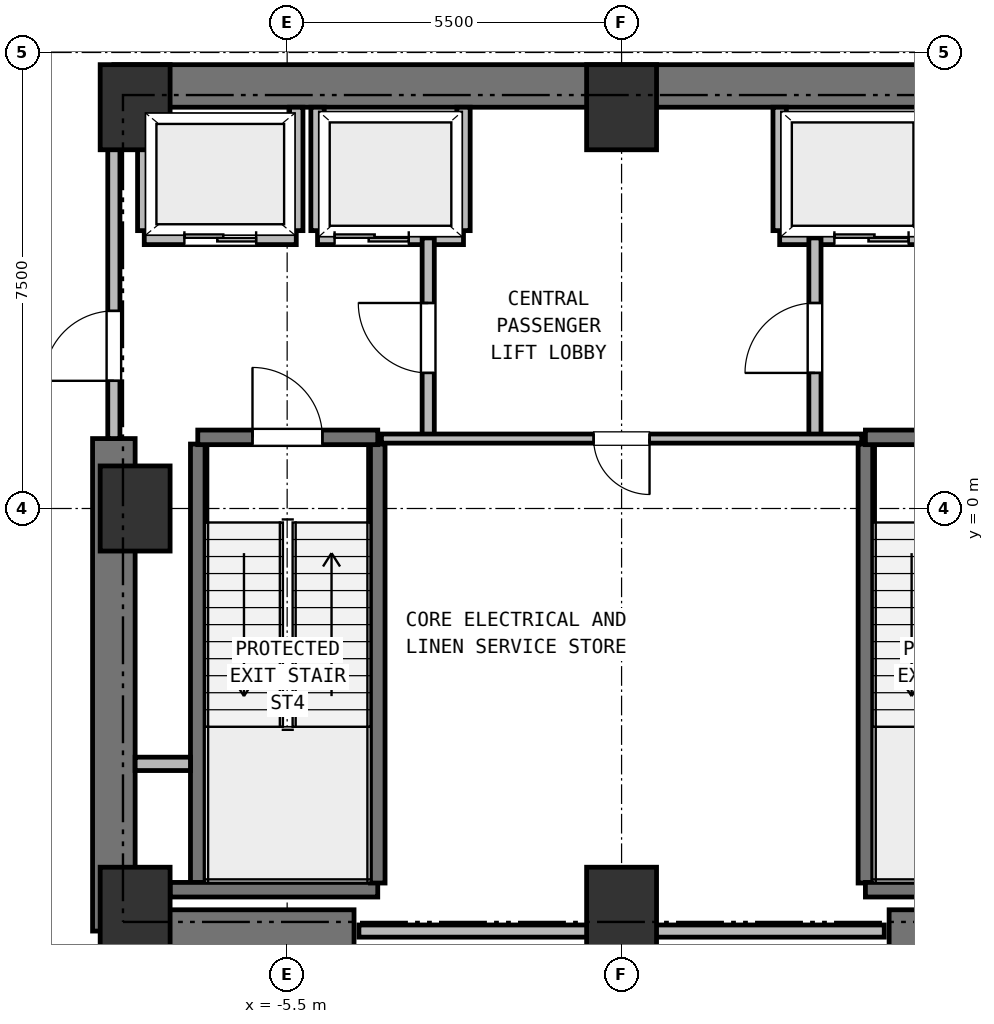
"""IFC4 building model, lengths in metres.
Left out: names, types, materials, properties, quantities, classifications, styles, units other than length and angle.
Written with IfcOpenShell. Run it as: python <this file> out.ifc"""

import sys

from ifc_helpers import new_model, si_unit, direction, frame, frame_2d, origin, origin_2d, place, context, subcontext, project, spatial, rectangle, extrude, element, fill, save


model = new_model("IFC4")
c1 = context("Model", 3, precision=1e-05, world=origin(), true_north=direction((0.0, 1.0)))
c2 = subcontext(c1, "Body", "Model", "MODEL_VIEW")
j1 = project(units=[si_unit("LENGTHUNIT", "METRE"), si_unit("PLANEANGLEUNIT", "RADIAN")], contexts=[c1])
p1 = place(None, origin())
s1 = spatial("IfcSite", under=j1, at=p1, CompositionType="ELEMENT")
p2 = place(p1, origin())
s2 = spatial("IfcBuilding", under=s1, at=p2, CompositionType="ELEMENT")
p3 = place(p2, frame((0.0, 0.0, -13.5)))
s3 = spatial("IfcBuildingStorey", under=s2, at=p3, CompositionType="ELEMENT", Elevation=-13.5)
for number, where, z_axis, x_axis in (
    (1, (-8.0, -6.6, 0.0), (0.0, 0.0, 1.0), (1.0, 0.0, 0.0)),
    (2, (0.0, -6.6, 0.0), (0.0, 0.0, 1.0), (1.0, 0.0, 0.0)),
    (3, (0.0, 6.6, 0.0), (0.0, 0.0, 1.0), (1.0, 0.0, 0.0)),
    (4, (-8.0, 6.6, 0.0), (0.0, 0.0, 1.0), (1.0, 0.0, 0.0)),
    (5, (-8.0, 0.0, 0.0), (0.0, 0.0, 1.0), (1.0, 0.0, 0.0)),
):
    element("IfcColumn", number, at=place(p3, frame(where, z_axis=z_axis, x_axis=x_axis)), inside=s3, PredefinedType="COLUMN", context=c2, shape_type="SweptSolid", body=[
        extrude(rectangle(XDim=1.15, YDim=1.4, at=origin_2d()), origin(), (0.0, 0.0, 1.0), 4.5),
    ])
p4 = place(p3, frame((-8.35, 6.95, 0.0), z_axis=(0.0, 0.0, 1.0), x_axis=(1.0, 0.0, 0.0)))
e6 = element("IfcWall", 6, at=p4, inside=s3, PredefinedType="SHEAR", context=c2, shape_type="SweptSolid", body=[
    extrude(rectangle(XDim=16.7, YDim=0.7, at=frame_2d((8.35, 0.0))), origin(), (0.0, 0.0, 1.0), 4.2),
])
for number, where, z_axis, x_axis in (
    (7, (-8.35, -6.95, 0.0), (0.0, 0.0, 1.0), (1.0, 0.0, 0.0)),
    (8, (4.4, -6.95, 0.0), (0.0, 0.0, 1.0), (1.0, 0.0, 0.0)),
):
    element("IfcWall", number, at=place(p3, frame(where, z_axis=z_axis, x_axis=x_axis)), inside=s3, PredefinedType="SHEAR", context=c2, shape_type="SweptSolid", body=[
        extrude(rectangle(XDim=3.95, YDim=0.7, at=frame_2d((1.975, 0.0))), origin(), (0.0, 0.0, 1.0), 4.2),
    ])
p5 = place(p3, frame((-8.35, -6.95, 0.0), z_axis=(0.0, 0.0, 1.0), x_axis=(0.0, 1.0, 0.0)))
e9 = element("IfcWall", 9, at=p5, inside=s3, PredefinedType="SHEAR", context=c2, shape_type="SweptSolid", body=[
    extrude(rectangle(XDim=8.1, YDim=0.7, at=frame_2d((4.05, 0.0))), origin(), (0.0, 0.0, 1.0), 4.2),
])
p6 = place(p3, frame((-6.97, -6.16, 0.0), z_axis=(0.0, 0.0, 1.0), x_axis=(0.0, 1.0, 0.0)))
e10 = element("IfcWall", 10, at=p6, inside=s3, PredefinedType="SHEAR", context=c2, shape_type="SweptSolid", body=[
    extrude(rectangle(XDim=7.22, YDim=0.24, at=frame_2d((3.61, 0.0))), origin(), (0.0, 0.0, 1.0), 4.2),
])
p7 = place(p3, frame((-7.425, -6.27, 0.0), z_axis=(0.0, 0.0, 1.0), x_axis=(1.0, 0.0, 0.0)))
e11 = element("IfcWall", 11, at=p7, inside=s3, PredefinedType="SHEAR", context=c2, shape_type="SweptSolid", body=[
    extrude(rectangle(XDim=3.415, YDim=0.24, at=frame_2d((1.708, 0.0))), origin(), (0.0, 0.0, 1.0), 4.2),
])
p8 = place(p3, frame((-4.01, -6.16, 0.0), z_axis=(0.0, 0.0, 1.0), x_axis=(0.0, 1.0, 0.0)))
e12 = element("IfcWall", 12, at=p8, inside=s3, PredefinedType="SHEAR", context=c2, shape_type="SweptSolid", body=[
    extrude(rectangle(XDim=7.22, YDim=0.24, at=frame_2d((3.61, 0.0))), origin(), (0.0, 0.0, 1.0), 4.2),
])
p9 = place(p3, frame((-6.97, 1.17, 0.0), z_axis=(0.0, 0.0, 1.0), x_axis=(1.0, 0.0, 0.0)))
e13 = element("IfcWall", 13, at=p9, inside=s3, PredefinedType="SHEAR", context=c2, shape_type="SweptSolid", body=[
    extrude(rectangle(XDim=2.96, YDim=0.24, at=frame_2d((1.48, 0.0))), origin(), (0.0, 0.0, 1.0), 4.2),
])
p10 = place(p9, frame((0.9, 0.0, 0.0)))
e14 = element("IfcOpeningElement", 14, at=p10, cuts=e13, PredefinedType="OPENING", context=c2, shape_type="SweptSolid", body=[
    extrude(rectangle(XDim=1.15, YDim=2.15, at=frame_2d((0.575, 1.075))), frame((0.0, 0.13, 0.0), z_axis=(0.0, -1.0, 0.0), x_axis=(1.0, 0.0, 0.0)), (0.0, 0.0, 1.0), 0.26),
])
p11 = place(p3, frame((4.01, -6.16, 0.0), z_axis=(0.0, 0.0, 1.0), x_axis=(0.0, 1.0, 0.0)))
e15 = element("IfcWall", 15, at=p11, inside=s3, PredefinedType="SHEAR", context=c2, shape_type="SweptSolid", body=[
    extrude(rectangle(XDim=7.22, YDim=0.24, at=frame_2d((3.61, 0.0))), origin(), (0.0, 0.0, 1.0), 4.2),
])
p12 = place(p3, frame((4.01, -6.27, 0.0), z_axis=(0.0, 0.0, 1.0), x_axis=(1.0, 0.0, 0.0)))
e16 = element("IfcWall", 16, at=p12, inside=s3, PredefinedType="SHEAR", context=c2, shape_type="SweptSolid", body=[
    extrude(rectangle(XDim=3.415, YDim=0.24, at=frame_2d((1.708, 0.0))), origin(), (0.0, 0.0, 1.0), 4.2),
])
p13 = place(p3, frame((4.01, 1.17, 0.0), z_axis=(0.0, 0.0, 1.0), x_axis=(1.0, 0.0, 0.0)))
e17 = element("IfcWall", 17, at=p13, inside=s3, PredefinedType="SHEAR", context=c2, shape_type="SweptSolid", body=[
    extrude(rectangle(XDim=2.96, YDim=0.24, at=frame_2d((1.48, 0.0))), origin(), (0.0, 0.0, 1.0), 4.2),
])
p14 = place(p13, frame((0.9, 0.0, 0.0)))
e18 = element("IfcOpeningElement", 18, at=p14, cuts=e17, PredefinedType="OPENING", context=c2, shape_type="SweptSolid", body=[
    extrude(rectangle(XDim=1.15, YDim=2.15, at=frame_2d((0.575, 1.075))), frame((0.0, 0.13, 0.0), z_axis=(0.0, -1.0, 0.0), x_axis=(1.0, 0.0, 0.0)), (0.0, 0.0, 1.0), 0.26),
])
p15 = place(p3, frame((-8.0, -4.2, 0.0), z_axis=(0.0, 0.0, 1.0), x_axis=(1.0, 0.0, 0.0)))
e19 = element("IfcWall", 19, at=p15, inside=s3, PredefinedType="PARTITIONING", context=c2, shape_type="SweptSolid", body=[
    extrude(rectangle(XDim=0.91, YDim=0.22, at=frame_2d((0.455, 0.0))), origin(), (0.0, 0.0, 1.0), 4.2),
])
p16 = place(p3, frame((-7.85, 4.45, 0.0), z_axis=(0.0, 0.0, 1.0), x_axis=(1.0, 0.0, 0.0)))
e20 = element("IfcWall", 20, at=p16, inside=s3, PredefinedType="PARTITIONING", context=c2, shape_type="SweptSolid", body=[
    extrude(rectangle(XDim=2.5, YDim=0.22, at=frame_2d((1.25, 0.0))), origin(), (0.0, 0.0, 1.0), 4.2),
])
p17 = place(p16, frame((0.66, 0.0, 0.0)))
e21 = element("IfcOpeningElement", 21, at=p17, cuts=e20, PredefinedType="OPENING", context=c2, shape_type="SweptSolid", body=[
    extrude(rectangle(XDim=1.18, YDim=2.15, at=frame_2d((0.59, 1.075))), frame((0.0, 0.12, 0.0), z_axis=(0.0, -1.0, 0.0), x_axis=(1.0, 0.0, 0.0)), (0.0, 0.0, 1.0), 0.24),
])
p18 = place(p3, frame((-7.85, 4.57, 0.0), z_axis=(0.0, 0.0, 1.0), x_axis=(0.0, 1.0, 0.0)))
e22 = element("IfcWall", 22, at=p18, inside=s3, PredefinedType="PARTITIONING", context=c2, shape_type="SweptSolid", body=[
    extrude(rectangle(XDim=2.03, YDim=0.22, at=frame_2d((1.015, 0.0))), origin(), (0.0, 0.0, 1.0), 3.78),
])
p19 = place(p3, frame((-5.35, 4.57, 0.0), z_axis=(0.0, 0.0, 1.0), x_axis=(0.0, 1.0, 0.0)))
e23 = element("IfcWall", 23, at=p19, inside=s3, PredefinedType="PARTITIONING", context=c2, shape_type="SweptSolid", body=[
    extrude(rectangle(XDim=2.03, YDim=0.22, at=frame_2d((1.015, 0.0))), origin(), (0.0, 0.0, 1.0), 4.2),
])
p20 = place(p3, frame((-5.0, 4.45, 0.0), z_axis=(0.0, 0.0, 1.0), x_axis=(1.0, 0.0, 0.0)))
e24 = element("IfcWall", 24, at=p20, inside=s3, PredefinedType="PARTITIONING", context=c2, shape_type="SweptSolid", body=[
    extrude(rectangle(XDim=2.4, YDim=0.22, at=frame_2d((1.2, 0.0))), origin(), (0.0, 0.0, 1.0), 4.2),
])
p21 = place(p20, frame((0.28, 0.0, 0.0)))
e25 = element("IfcOpeningElement", 25, at=p21, cuts=e24, PredefinedType="OPENING", context=c2, shape_type="SweptSolid", body=[
    extrude(rectangle(XDim=1.22, YDim=2.15, at=frame_2d((0.61, 1.075))), frame((0.0, 0.12, 0.0), z_axis=(0.0, -1.0, 0.0), x_axis=(1.0, 0.0, 0.0)), (0.0, 0.0, 1.0), 0.24),
])
for number, where, z_axis, x_axis in (
    (26, (-5.0, 4.57, 0.0), (0.0, 0.0, 1.0), (0.0, 1.0, 0.0)),
    (27, (-2.6, 4.57, 0.0), (0.0, 0.0, 1.0), (0.0, 1.0, 0.0)),
):
    element("IfcWall", number, at=place(p3, frame(where, z_axis=z_axis, x_axis=x_axis)), inside=s3, PredefinedType="PARTITIONING", context=c2, shape_type="SweptSolid", body=[
        extrude(rectangle(XDim=2.03, YDim=0.22, at=frame_2d((1.015, 0.0))), origin(), (0.0, 0.0, 1.0), 4.2),
    ])
p22 = place(p3, frame((2.6, 4.45, 0.0), z_axis=(0.0, 0.0, 1.0), x_axis=(1.0, 0.0, 0.0)))
e28 = element("IfcWall", 28, at=p22, inside=s3, PredefinedType="PARTITIONING", context=c2, shape_type="SweptSolid", body=[
    extrude(rectangle(XDim=2.4, YDim=0.22, at=frame_2d((1.2, 0.0))), origin(), (0.0, 0.0, 1.0), 4.2),
])
p23 = place(p22, frame((0.9, 0.0, 0.0)))
e29 = element("IfcOpeningElement", 29, at=p23, cuts=e28, PredefinedType="OPENING", context=c2, shape_type="SweptSolid", body=[
    extrude(rectangle(XDim=1.22, YDim=2.15, at=frame_2d((0.61, 1.075))), frame((0.0, 0.12, 0.0), z_axis=(0.0, -1.0, 0.0), x_axis=(1.0, 0.0, 0.0)), (0.0, 0.0, 1.0), 0.24),
])
p24 = place(p3, frame((2.6, 4.57, 0.0), z_axis=(0.0, 0.0, 1.0), x_axis=(0.0, 1.0, 0.0)))
e30 = element("IfcWall", 30, at=p24, inside=s3, PredefinedType="PARTITIONING", context=c2, shape_type="SweptSolid", body=[
    extrude(rectangle(XDim=2.03, YDim=0.22, at=frame_2d((1.015, 0.0))), origin(), (0.0, 0.0, 1.0), 4.2),
])
p25 = place(p3, frame((-3.18, 1.15, 0.0), z_axis=(0.0, 0.0, 1.0), x_axis=(0.0, 1.0, 0.0)))
e31 = element("IfcWall", 31, at=p25, inside=s3, PredefinedType="PARTITIONING", context=c2, shape_type="SweptSolid", body=[
    extrude(rectangle(XDim=3.3, YDim=0.2, at=frame_2d((1.65, 0.0))), origin(), (0.0, 0.0, 1.0), 4.2),
])
p26 = place(p25, frame((1.08, 0.0, 0.0)))
e32 = element("IfcOpeningElement", 32, at=p26, cuts=e31, PredefinedType="OPENING", context=c2, shape_type="SweptSolid", body=[
    extrude(rectangle(XDim=1.15, YDim=2.15, at=frame_2d((0.575, 1.075))), frame((0.0, 0.11, 0.0), z_axis=(0.0, -1.0, 0.0), x_axis=(1.0, 0.0, 0.0)), (0.0, 0.0, 1.0), 0.22),
])
p27 = place(p3, frame((3.18, 1.15, 0.0), z_axis=(0.0, 0.0, 1.0), x_axis=(0.0, 1.0, 0.0)))
e33 = element("IfcWall", 33, at=p27, inside=s3, PredefinedType="PARTITIONING", context=c2, shape_type="SweptSolid", body=[
    extrude(rectangle(XDim=3.3, YDim=0.2, at=frame_2d((1.65, 0.0))), origin(), (0.0, 0.0, 1.0), 4.2),
])
p28 = place(p27, frame((1.08, 0.0, 0.0)))
e34 = element("IfcOpeningElement", 34, at=p28, cuts=e33, PredefinedType="OPENING", context=c2, shape_type="SweptSolid", body=[
    extrude(rectangle(XDim=1.15, YDim=2.15, at=frame_2d((0.575, 1.075))), frame((0.0, 0.11, 0.0), z_axis=(0.0, -1.0, 0.0), x_axis=(1.0, 0.0, 0.0)), (0.0, 0.0, 1.0), 0.22),
])
p29 = place(p3, frame((-8.35, 1.15, 0.0), z_axis=(0.0, 0.0, 1.0), x_axis=(0.0, 1.0, 0.0)))
e35 = element("IfcWall", 35, at=p29, inside=s3, PredefinedType="PARTITIONING", context=c2, shape_type="SweptSolid", body=[
    extrude(rectangle(XDim=5.4, YDim=0.2, at=frame_2d((2.7, 0.0))), origin(), (0.0, 0.0, 1.0), 4.2),
])
p30 = place(p29, frame((0.95, 0.0, 0.0)))
e36 = element("IfcOpeningElement", 36, at=p30, cuts=e35, PredefinedType="OPENING", context=c2, shape_type="SweptSolid", body=[
    extrude(rectangle(XDim=1.15, YDim=2.15, at=frame_2d((0.575, 1.075))), frame((0.0, 0.11, 0.0), z_axis=(0.0, -1.0, 0.0), x_axis=(1.0, 0.0, 0.0)), (0.0, 0.0, 1.0), 0.22),
])
p31 = place(p3, frame((3.95, 1.15, 0.0), z_axis=(0.0, 0.0, 1.0), x_axis=(-1.0, 0.0, 0.0)))
e37 = element("IfcWall", 37, at=p31, inside=s3, PredefinedType="PARTITIONING", context=c2, shape_type="SweptSolid", body=[
    extrude(rectangle(XDim=7.9, YDim=0.15, at=frame_2d((3.95, 0.0))), origin(), (0.0, 0.0, 1.0), 4.2),
])
p32 = place(p31, frame((3.49, 0.0, 0.0)))
e38 = element("IfcOpeningElement", 38, at=p32, cuts=e37, PredefinedType="OPENING", context=c2, shape_type="SweptSolid", body=[
    extrude(rectangle(XDim=0.92, YDim=2.05, at=frame_2d((0.46, 1.025))), frame((0.0, 0.085, 0.0), z_axis=(0.0, -1.0, 0.0), x_axis=(1.0, 0.0, 0.0)), (0.0, 0.0, 1.0), 0.17),
])
p33 = place(p3, frame((-4.32, -6.95, 0.0), z_axis=(0.0, 0.0, 1.0), x_axis=(1.0, 0.0, 0.0)))
e39 = element("IfcWall", 39, at=p33, inside=s3, PredefinedType="PARTITIONING", context=c2, shape_type="SweptSolid", body=[
    extrude(rectangle(XDim=8.64, YDim=0.2, at=frame_2d((4.32, 0.0))), origin(), (0.0, 0.0, 1.0), 4.2),
])
p34 = place(p10, origin())
e40 = element("IfcDoor", 40, at=p34, inside=s3, OperationType="SINGLE_SWING_LEFT", PredefinedType="DOOR", context=c2, shape_type="SweptSolid", body=[
    extrude(rectangle(XDim=1.15, YDim=2.15, at=frame_2d((0.575, 1.075))), frame((0.0, 0.025, 0.0), z_axis=(0.0, -1.0, 0.0), x_axis=(1.0, 0.0, 0.0)), (0.0, 0.0, 1.0), 0.05),
])
fill(e14, e40)
p35 = place(p17, origin())
e41 = element("IfcDoor", 41, at=p35, inside=s3, OperationType="DOUBLE_DOOR_SLIDING", PredefinedType="DOOR", context=c2, shape_type="SweptSolid", body=[
    extrude(rectangle(XDim=1.18, YDim=2.15, at=frame_2d((0.59, 1.075))), frame((0.0, 0.025, 0.0), z_axis=(0.0, -1.0, 0.0), x_axis=(1.0, 0.0, 0.0)), (0.0, 0.0, 1.0), 0.05),
])
fill(e21, e41)
p36 = place(p21, origin())
e42 = element("IfcDoor", 42, at=p36, inside=s3, OperationType="DOUBLE_DOOR_SLIDING", PredefinedType="DOOR", context=c2, shape_type="SweptSolid", body=[
    extrude(rectangle(XDim=1.22, YDim=2.15, at=frame_2d((0.61, 1.075))), frame((0.0, 0.025, 0.0), z_axis=(0.0, -1.0, 0.0), x_axis=(1.0, 0.0, 0.0)), (0.0, 0.0, 1.0), 0.05),
])
fill(e25, e42)
p37 = place(p23, origin())
e43 = element("IfcDoor", 43, at=p37, inside=s3, OperationType="DOUBLE_DOOR_SLIDING", PredefinedType="DOOR", context=c2, shape_type="SweptSolid", body=[
    extrude(rectangle(XDim=1.22, YDim=2.15, at=frame_2d((0.61, 1.075))), frame((0.0, 0.025, 0.0), z_axis=(0.0, -1.0, 0.0), x_axis=(1.0, 0.0, 0.0)), (0.0, 0.0, 1.0), 0.05),
])
fill(e29, e43)
p38 = place(p26, origin())
e44 = element("IfcDoor", 44, at=p38, inside=s3, OperationType="SINGLE_SWING_RIGHT", PredefinedType="DOOR", context=c2, shape_type="SweptSolid", body=[
    extrude(rectangle(XDim=1.15, YDim=2.15, at=frame_2d((0.575, 1.075))), frame((0.0, 0.025, 0.0), z_axis=(0.0, -1.0, 0.0), x_axis=(1.0, 0.0, 0.0)), (0.0, 0.0, 1.0), 0.05),
])
fill(e32, e44)
p39 = place(p28, origin())
e45 = element("IfcDoor", 45, at=p39, inside=s3, OperationType="SINGLE_SWING_LEFT", PredefinedType="DOOR", context=c2, shape_type="SweptSolid", body=[
    extrude(rectangle(XDim=1.15, YDim=2.15, at=frame_2d((0.575, 1.075))), frame((0.0, 0.025, 0.0), z_axis=(0.0, -1.0, 0.0), x_axis=(1.0, 0.0, 0.0)), (0.0, 0.0, 1.0), 0.05),
])
fill(e34, e45)
p40 = place(p30, origin())
e46 = element("IfcDoor", 46, at=p40, inside=s3, OperationType="SINGLE_SWING_LEFT", PredefinedType="DOOR", context=c2, shape_type="SweptSolid", body=[
    extrude(rectangle(XDim=1.15, YDim=2.15, at=frame_2d((0.575, 1.075))), frame((0.0, 0.025, 0.0), z_axis=(0.0, -1.0, 0.0), x_axis=(1.0, 0.0, 0.0)), (0.0, 0.0, 1.0), 0.05),
])
fill(e36, e46)
p41 = place(p32, origin())
e47 = element("IfcDoor", 47, at=p41, inside=s3, OperationType="SINGLE_SWING_LEFT", PredefinedType="DOOR", context=c2, shape_type="SweptSolid", body=[
    extrude(rectangle(XDim=0.92, YDim=2.05, at=frame_2d((0.46, 1.025))), frame((0.0, 0.025, 0.0), z_axis=(0.0, -1.0, 0.0), x_axis=(1.0, 0.0, 0.0)), (0.0, 0.0, 1.0), 0.05),
])
fill(e38, e47)
save(model, sys.argv[1])
